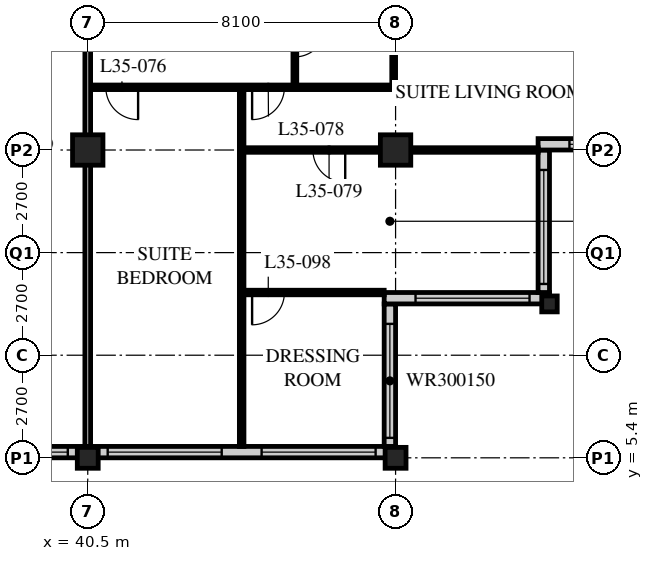
"""IFC4 building model, lengths in metres.
Left out: names, types, materials, properties, quantities, classifications, styles, units other than length and angle.
Written with IfcOpenShell. Run it as: python <this file> out.ifc"""

import sys

from ifc_helpers import new_model, si_unit, direction, frame, frame_2d, origin, origin_2d, place, context, subcontext, project, spatial, rectangle, hollow_rectangle, i_section, extrude, element, fill, save


model = new_model("IFC4")
c1 = context("Model", 3, precision=1e-05, world=origin(), true_north=direction((0.0, 1.0)))
c2 = subcontext(c1, "Body", "Model", "MODEL_VIEW")
j1 = project(units=[si_unit("LENGTHUNIT", "METRE"), si_unit("PLANEANGLEUNIT", "RADIAN")], contexts=[c1])
p1 = place(None, origin())
s1 = spatial("IfcSite", under=j1, at=p1, CompositionType="ELEMENT")
p2 = place(p1, origin())
s2 = spatial("IfcBuilding", under=s1, at=p2, CompositionType="ELEMENT")
p3 = place(p2, frame((0.0, 0.0, 137.4)))
s3 = spatial("IfcBuildingStorey", under=s2, at=p3, CompositionType="ELEMENT", Elevation=137.4)
p4 = place(p3, frame((40.5, 5.4, 0.0), z_axis=(0.0, 0.0, 1.0), x_axis=(1.0, 0.0, 0.0)))
e1 = element("IfcColumn", 1, at=p4, inside=s3, PredefinedType="COLUMN", context=c2, shape_type="SweptSolid", body=[
    extrude(hollow_rectangle(XDim=0.55, YDim=0.55, WallThickness=0.04, at=origin_2d()), origin(), (0.0, 0.0, 1.0), 3.4),
])
p5 = place(p3, frame((40.5, 13.5, 0.0), z_axis=(0.0, 0.0, 1.0), x_axis=(1.0, 0.0, 0.0)))
e2 = element("IfcColumn", 2, at=p5, inside=s3, PredefinedType="COLUMN", context=c2, shape_type="SweptSolid", body=[
    extrude(hollow_rectangle(XDim=0.8, YDim=0.8, WallThickness=0.08, at=origin_2d()), origin(), (0.0, 0.0, 1.0), 3.4),
])
p6 = place(p3, frame((48.6, 5.4, 0.0), z_axis=(0.0, 0.0, 1.0), x_axis=(1.0, 0.0, 0.0)))
e3 = element("IfcColumn", 3, at=p6, inside=s3, PredefinedType="COLUMN", context=c2, shape_type="SweptSolid", body=[
    extrude(hollow_rectangle(XDim=0.55, YDim=0.55, WallThickness=0.04, at=origin_2d()), origin(), (0.0, 0.0, 1.0), 3.4),
])
p7 = place(p3, frame((48.6, 13.5, 0.0), z_axis=(0.0, 0.0, 1.0), x_axis=(1.0, 0.0, 0.0)))
e4 = element("IfcColumn", 4, at=p7, inside=s3, PredefinedType="COLUMN", context=c2, shape_type="SweptSolid", body=[
    extrude(hollow_rectangle(XDim=0.8, YDim=0.8, WallThickness=0.08, at=origin_2d()), origin(), (0.0, 0.0, 1.0), 3.4),
])
p8 = place(p3, frame((52.65, 9.45, 0.0), z_axis=(0.0, 0.0, 1.0), x_axis=(1.0, 0.0, 0.0)))
e5 = element("IfcColumn", 5, at=p8, inside=s3, PredefinedType="COLUMN", context=c2, shape_type="SweptSolid", body=[
    extrude(i_section(OverallWidth=0.407, OverallDepth=0.419, WebThickness=0.031, FlangeThickness=0.049, FilletRadius=0.015, at=origin_2d()), origin(), (0.0, 0.0, 1.0), 3.4),
])
p9 = place(p3, frame((8.4, 5.55, 0.0), z_axis=(0.0, 0.0, 1.0), x_axis=(1.0, 0.0, 0.0)))
e6 = element("IfcWall", 6, at=p9, inside=s3, PredefinedType="SOLIDWALL", context=c2, shape_type="SweptSolid", body=[
    extrude(rectangle(XDim=40.2, YDim=0.3, at=frame_2d((20.1, 0.0))), origin(), (0.0, 0.0, 1.0), 3.19),
])
p10 = place(p9, frame((0.225, 0.0, 0.9)))
e7 = element("IfcOpeningElement", 7, at=p10, cuts=e6, PredefinedType="OPENING", context=c2, shape_type="SweptSolid", body=[
    extrude(rectangle(XDim=3.0, YDim=2.0, at=frame_2d((1.5, 1.0))), frame((0.0, 0.16, 0.0), z_axis=(0.0, -1.0, 0.0), x_axis=(1.0, 0.0, 0.0)), (0.0, 0.0, 1.0), 0.32),
])
p11 = place(p9, frame((4.275, 0.0, 0.9)))
e8 = element("IfcOpeningElement", 8, at=p11, cuts=e6, PredefinedType="OPENING", context=c2, shape_type="SweptSolid", body=[
    extrude(rectangle(XDim=3.0, YDim=2.0, at=frame_2d((1.5, 1.0))), frame((0.0, 0.16, 0.0), z_axis=(0.0, -1.0, 0.0), x_axis=(1.0, 0.0, 0.0)), (0.0, 0.0, 1.0), 0.32),
])
p12 = place(p9, frame((8.325, 0.0, 0.9)))
e9 = element("IfcOpeningElement", 9, at=p12, cuts=e6, PredefinedType="OPENING", context=c2, shape_type="SweptSolid", body=[
    extrude(rectangle(XDim=3.0, YDim=2.0, at=frame_2d((1.5, 1.0))), frame((0.0, 0.16, 0.0), z_axis=(0.0, -1.0, 0.0), x_axis=(1.0, 0.0, 0.0)), (0.0, 0.0, 1.0), 0.32),
])
p13 = place(p9, frame((12.375, 0.0, 0.9)))
e10 = element("IfcOpeningElement", 10, at=p13, cuts=e6, PredefinedType="OPENING", context=c2, shape_type="SweptSolid", body=[
    extrude(rectangle(XDim=3.0, YDim=2.0, at=frame_2d((1.5, 1.0))), frame((0.0, 0.16, 0.0), z_axis=(0.0, -1.0, 0.0), x_axis=(1.0, 0.0, 0.0)), (0.0, 0.0, 1.0), 0.32),
])
p14 = place(p9, frame((16.425, 0.0, 0.9)))
e11 = element("IfcOpeningElement", 11, at=p14, cuts=e6, PredefinedType="OPENING", context=c2, shape_type="SweptSolid", body=[
    extrude(rectangle(XDim=3.0, YDim=2.0, at=frame_2d((1.5, 1.0))), frame((0.0, 0.16, 0.0), z_axis=(0.0, -1.0, 0.0), x_axis=(1.0, 0.0, 0.0)), (0.0, 0.0, 1.0), 0.32),
])
p15 = place(p9, frame((20.475, 0.0, 0.9)))
e12 = element("IfcOpeningElement", 12, at=p15, cuts=e6, PredefinedType="OPENING", context=c2, shape_type="SweptSolid", body=[
    extrude(rectangle(XDim=3.0, YDim=2.0, at=frame_2d((1.5, 1.0))), frame((0.0, 0.16, 0.0), z_axis=(0.0, -1.0, 0.0), x_axis=(1.0, 0.0, 0.0)), (0.0, 0.0, 1.0), 0.32),
])
p16 = place(p9, frame((24.525, 0.0, 0.9)))
e13 = element("IfcOpeningElement", 13, at=p16, cuts=e6, PredefinedType="OPENING", context=c2, shape_type="SweptSolid", body=[
    extrude(rectangle(XDim=3.0, YDim=2.0, at=frame_2d((1.5, 1.0))), frame((0.0, 0.16, 0.0), z_axis=(0.0, -1.0, 0.0), x_axis=(1.0, 0.0, 0.0)), (0.0, 0.0, 1.0), 0.32),
])
p17 = place(p9, frame((28.575, 0.0, 0.9)))
e14 = element("IfcOpeningElement", 14, at=p17, cuts=e6, PredefinedType="OPENING", context=c2, shape_type="SweptSolid", body=[
    extrude(rectangle(XDim=3.0, YDim=2.0, at=frame_2d((1.5, 1.0))), frame((0.0, 0.16, 0.0), z_axis=(0.0, -1.0, 0.0), x_axis=(1.0, 0.0, 0.0)), (0.0, 0.0, 1.0), 0.32),
])
p18 = place(p9, frame((32.625, 0.0, 0.9)))
e15 = element("IfcOpeningElement", 15, at=p18, cuts=e6, PredefinedType="OPENING", context=c2, shape_type="SweptSolid", body=[
    extrude(rectangle(XDim=3.0, YDim=2.0, at=frame_2d((1.5, 1.0))), frame((0.0, 0.16, 0.0), z_axis=(0.0, -1.0, 0.0), x_axis=(1.0, 0.0, 0.0)), (0.0, 0.0, 1.0), 0.32),
])
p19 = place(p9, frame((36.675, 0.0, 0.9)))
e16 = element("IfcOpeningElement", 16, at=p19, cuts=e6, PredefinedType="OPENING", context=c2, shape_type="SweptSolid", body=[
    extrude(rectangle(XDim=3.0, YDim=2.0, at=frame_2d((1.5, 1.0))), frame((0.0, 0.16, 0.0), z_axis=(0.0, -1.0, 0.0), x_axis=(1.0, 0.0, 0.0)), (0.0, 0.0, 1.0), 0.32),
])
p20 = place(p3, frame((48.45, 5.7, 0.0), z_axis=(0.0, 0.0, 1.0), x_axis=(0.0, 1.0, 0.0)))
e17 = element("IfcWall", 17, at=p20, inside=s3, PredefinedType="SOLIDWALL", context=c2, shape_type="SweptSolid", body=[
    extrude(rectangle(XDim=3.75, YDim=0.3, at=frame_2d((1.875, 0.0))), origin(), (0.0, 0.0, 1.0), 3.19),
])
p21 = place(p20, frame((0.225, 0.0, 0.9)))
e18 = element("IfcOpeningElement", 18, at=p21, cuts=e17, PredefinedType="OPENING", context=c2, shape_type="SweptSolid", body=[
    extrude(rectangle(XDim=3.0, YDim=1.5, at=frame_2d((1.5, 0.75))), frame((0.0, 0.16, 0.0), z_axis=(0.0, -1.0, 0.0), x_axis=(1.0, 0.0, 0.0)), (0.0, 0.0, 1.0), 0.32),
])
p22 = place(p3, frame((48.3, 9.6, 0.0), z_axis=(0.0, 0.0, 1.0), x_axis=(1.0, 0.0, 0.0)))
e19 = element("IfcWall", 19, at=p22, inside=s3, PredefinedType="SOLIDWALL", context=c2, shape_type="SweptSolid", body=[
    extrude(rectangle(XDim=4.35, YDim=0.3, at=frame_2d((2.175, 0.0))), origin(), (0.0, 0.0, 1.0), 3.19),
])
p23 = place(p22, frame((0.825, 0.0, 0.9)))
e20 = element("IfcOpeningElement", 20, at=p23, cuts=e19, PredefinedType="OPENING", context=c2, shape_type="SweptSolid", body=[
    extrude(rectangle(XDim=3.0, YDim=1.5, at=frame_2d((1.5, 0.75))), frame((0.0, 0.16, 0.0), z_axis=(0.0, -1.0, 0.0), x_axis=(1.0, 0.0, 0.0)), (0.0, 0.0, 1.0), 0.32),
])
p24 = place(p3, frame((52.5, 9.75, 0.0), z_axis=(0.0, 0.0, 1.0), x_axis=(0.0, 1.0, 0.0)))
e21 = element("IfcWall", 21, at=p24, inside=s3, PredefinedType="SOLIDWALL", context=c2, shape_type="SweptSolid", body=[
    extrude(rectangle(XDim=3.75, YDim=0.3, at=frame_2d((1.875, 0.0))), origin(), (0.0, 0.0, 1.0), 3.19),
])
p25 = place(p24, frame((0.225, 0.0, 0.9)))
e22 = element("IfcOpeningElement", 22, at=p25, cuts=e21, PredefinedType="OPENING", context=c2, shape_type="SweptSolid", body=[
    extrude(rectangle(XDim=3.0, YDim=1.5, at=frame_2d((1.5, 0.75))), frame((0.0, 0.16, 0.0), z_axis=(0.0, -1.0, 0.0), x_axis=(1.0, 0.0, 0.0)), (0.0, 0.0, 1.0), 0.32),
])
p26 = place(p3, frame((52.35, 13.65, 0.0), z_axis=(0.0, 0.0, 1.0), x_axis=(1.0, 0.0, 0.0)))
e23 = element("IfcWall", 23, at=p26, inside=s3, PredefinedType="SOLIDWALL", context=c2, shape_type="SweptSolid", body=[
    extrude(rectangle(XDim=4.35, YDim=0.3, at=frame_2d((2.175, 0.0))), origin(), (0.0, 0.0, 1.0), 3.19),
])
p27 = place(p26, frame((0.825, 0.0, 0.9)))
e24 = element("IfcOpeningElement", 24, at=p27, cuts=e23, PredefinedType="OPENING", context=c2, shape_type="SweptSolid", body=[
    extrude(rectangle(XDim=3.0, YDim=1.5, at=frame_2d((1.5, 0.75))), frame((0.0, 0.16, 0.0), z_axis=(0.0, -1.0, 0.0), x_axis=(1.0, 0.0, 0.0)), (0.0, 0.0, 1.0), 0.32),
])
p28 = place(p3, frame((40.5, 15.15, 0.0), z_axis=(0.0, 0.0, 1.0), x_axis=(1.0, 0.0, 0.0)))
e25 = element("IfcWall", 25, at=p28, inside=s3, PredefinedType="PARTITIONING", context=c2, shape_type="SweptSolid", body=[
    extrude(rectangle(XDim=8.05, YDim=0.12, at=frame_2d((4.025, 0.0))), origin(), (0.0, 0.0, 1.0), 3.19),
])
p29 = place(p28, frame((0.475, 0.0, 0.0)))
e26 = element("IfcOpeningElement", 26, at=p29, cuts=e25, PredefinedType="OPENING", context=c2, shape_type="SweptSolid", body=[
    extrude(rectangle(XDim=0.85, YDim=2.1, at=frame_2d((0.425, 1.05))), frame((0.0, 0.07, 0.0), z_axis=(0.0, -1.0, 0.0), x_axis=(1.0, 0.0, 0.0)), (0.0, 0.0, 1.0), 0.14),
])
p30 = place(p28, frame((4.325, 0.0, 0.0)))
e27 = element("IfcOpeningElement", 27, at=p30, cuts=e25, PredefinedType="OPENING", context=c2, shape_type="SweptSolid", body=[
    extrude(rectangle(XDim=0.85, YDim=2.1, at=frame_2d((0.425, 1.05))), frame((0.0, 0.07, 0.0), z_axis=(0.0, -1.0, 0.0), x_axis=(1.0, 0.0, 0.0)), (0.0, 0.0, 1.0), 0.14),
])
p31 = place(p3, frame((45.95, 17.55, 0.0), z_axis=(0.0, 0.0, 1.0), x_axis=(0.0, -1.0, 0.0)))
e28 = element("IfcWall", 28, at=p31, inside=s3, PredefinedType="PARTITIONING", context=c2, shape_type="SweptSolid", body=[
    extrude(rectangle(XDim=2.4, YDim=0.1, at=frame_2d((1.2, 0.0))), origin(), (0.0, 0.0, 1.0), 3.19),
])
p32 = place(p31, frame((0.8, 0.0, 0.0)))
e29 = element("IfcOpeningElement", 29, at=p32, cuts=e28, PredefinedType="OPENING", context=c2, shape_type="SweptSolid", body=[
    extrude(rectangle(XDim=0.8, YDim=2.1, at=frame_2d((0.4, 1.05))), frame((0.0, 0.06, 0.0), z_axis=(0.0, -1.0, 0.0), x_axis=(1.0, 0.0, 0.0)), (0.0, 0.0, 1.0), 0.12),
])
p33 = place(p3, frame((48.55, 17.55, 0.0), z_axis=(0.0, 0.0, 1.0), x_axis=(0.0, -1.0, 0.0)))
e30 = element("IfcWall", 30, at=p33, inside=s3, PredefinedType="PARTITIONING", context=c2, shape_type="SweptSolid", body=[
    extrude(rectangle(XDim=2.4, YDim=0.1, at=frame_2d((1.2, 0.0))), origin(), (0.0, 0.0, 1.0), 2.578),
])
p34 = place(p3, frame((44.55, 15.15, 0.0), z_axis=(0.0, 0.0, 1.0), x_axis=(0.0, -1.0, 0.0)))
e31 = element("IfcWall", 31, at=p34, inside=s3, PredefinedType="PARTITIONING", context=c2, shape_type="SweptSolid", body=[
    extrude(rectangle(XDim=9.45, YDim=0.12, at=frame_2d((4.725, 0.0))), origin(), (0.0, 0.0, 1.0), 3.19),
])
p35 = place(p3, frame((44.55, 13.5, 0.0), z_axis=(0.0, 0.0, 1.0), x_axis=(1.0, 0.0, 0.0)))
e32 = element("IfcWall", 32, at=p35, inside=s3, PredefinedType="PARTITIONING", context=c2, shape_type="SweptSolid", body=[
    extrude(rectangle(XDim=7.8, YDim=0.12, at=frame_2d((3.9, 0.0))), origin(), (0.0, 0.0, 1.0), 2.578),
])
p36 = place(p35, frame((1.875, 0.0, 0.0)))
e33 = element("IfcOpeningElement", 33, at=p36, cuts=e32, PredefinedType="OPENING", context=c2, shape_type="SweptSolid", body=[
    extrude(rectangle(XDim=0.85, YDim=2.1, at=frame_2d((0.425, 1.05))), frame((0.0, 0.07, 0.0), z_axis=(0.0, -1.0, 0.0), x_axis=(1.0, 0.0, 0.0)), (0.0, 0.0, 1.0), 0.14),
])
p37 = place(p3, frame((40.5, 17.55, 0.0), z_axis=(0.0, 0.0, 1.0), x_axis=(0.0, -1.0, 0.0)))
e34 = element("IfcWall", 34, at=p37, inside=s3, PredefinedType="PARTITIONING", context=c2, shape_type="SweptSolid", body=[
    extrude(rectangle(XDim=11.85, YDim=0.15, at=frame_2d((5.925, 0.0))), origin(), (0.0, 0.0, 1.0), 2.578),
])
p38 = place(p3, frame((44.55, 9.75, 0.0), z_axis=(0.0, 0.0, 1.0), x_axis=(1.0, 0.0, 0.0)))
e35 = element("IfcWall", 35, at=p38, inside=s3, PredefinedType="PARTITIONING", context=c2, shape_type="SweptSolid", body=[
    extrude(rectangle(XDim=3.75, YDim=0.12, at=frame_2d((1.875, 0.0))), origin(), (0.0, 0.0, 1.0), 3.19),
])
p39 = place(p38, frame((0.275, 0.0, 0.0)))
e36 = element("IfcOpeningElement", 36, at=p39, cuts=e35, PredefinedType="OPENING", context=c2, shape_type="SweptSolid", body=[
    extrude(rectangle(XDim=0.85, YDim=2.1, at=frame_2d((0.425, 1.05))), frame((0.0, 0.07, 0.0), z_axis=(0.0, -1.0, 0.0), x_axis=(1.0, 0.0, 0.0)), (0.0, 0.0, 1.0), 0.14),
])
p40 = place(p17, origin())
e37 = element("IfcWindow", 37, at=p40, inside=s3, PartitioningType="SINGLE_PANEL", PredefinedType="WINDOW", context=c2, shape_type="SweptSolid", body=[
    extrude(rectangle(XDim=3.0, YDim=2.0, at=frame_2d((1.5, 1.0))), frame((0.0, 0.03, 0.0), z_axis=(0.0, -1.0, 0.0), x_axis=(1.0, 0.0, 0.0)), (0.0, 0.0, 1.0), 0.06),
])
fill(e14, e37)
p41 = place(p18, origin())
e38 = element("IfcWindow", 38, at=p41, inside=s3, PartitioningType="SINGLE_PANEL", PredefinedType="WINDOW", context=c2, shape_type="SweptSolid", body=[
    extrude(rectangle(XDim=3.0, YDim=2.0, at=frame_2d((1.5, 1.0))), frame((0.0, 0.03, 0.0), z_axis=(0.0, -1.0, 0.0), x_axis=(1.0, 0.0, 0.0)), (0.0, 0.0, 1.0), 0.06),
])
fill(e15, e38)
p42 = place(p19, origin())
e39 = element("IfcWindow", 39, at=p42, inside=s3, PartitioningType="SINGLE_PANEL", PredefinedType="WINDOW", context=c2, shape_type="SweptSolid", body=[
    extrude(rectangle(XDim=3.0, YDim=2.0, at=frame_2d((1.5, 1.0))), frame((0.0, 0.03, 0.0), z_axis=(0.0, -1.0, 0.0), x_axis=(1.0, 0.0, 0.0)), (0.0, 0.0, 1.0), 0.06),
])
fill(e16, e39)
p43 = place(p21, origin())
e40 = element("IfcWindow", 40, at=p43, inside=s3, PartitioningType="SINGLE_PANEL", PredefinedType="WINDOW", context=c2, shape_type="SweptSolid", body=[
    extrude(rectangle(XDim=3.0, YDim=1.5, at=frame_2d((1.5, 0.75))), frame((0.0, 0.03, 0.0), z_axis=(0.0, -1.0, 0.0), x_axis=(1.0, 0.0, 0.0)), (0.0, 0.0, 1.0), 0.06),
])
fill(e18, e40)
p44 = place(p23, origin())
e41 = element("IfcWindow", 41, at=p44, inside=s3, PartitioningType="SINGLE_PANEL", PredefinedType="WINDOW", context=c2, shape_type="SweptSolid", body=[
    extrude(rectangle(XDim=3.0, YDim=1.5, at=frame_2d((1.5, 0.75))), frame((0.0, 0.03, 0.0), z_axis=(0.0, -1.0, 0.0), x_axis=(1.0, 0.0, 0.0)), (0.0, 0.0, 1.0), 0.06),
])
fill(e20, e41)
p45 = place(p25, origin())
e42 = element("IfcWindow", 42, at=p45, inside=s3, PartitioningType="SINGLE_PANEL", PredefinedType="WINDOW", context=c2, shape_type="SweptSolid", body=[
    extrude(rectangle(XDim=3.0, YDim=1.5, at=frame_2d((1.5, 0.75))), frame((0.0, 0.03, 0.0), z_axis=(0.0, -1.0, 0.0), x_axis=(1.0, 0.0, 0.0)), (0.0, 0.0, 1.0), 0.06),
])
fill(e22, e42)
p46 = place(p27, origin())
e43 = element("IfcWindow", 43, at=p46, inside=s3, PartitioningType="SINGLE_PANEL", PredefinedType="WINDOW", context=c2, shape_type="SweptSolid", body=[
    extrude(rectangle(XDim=3.0, YDim=1.5, at=frame_2d((1.5, 0.75))), frame((0.0, 0.03, 0.0), z_axis=(0.0, -1.0, 0.0), x_axis=(1.0, 0.0, 0.0)), (0.0, 0.0, 1.0), 0.06),
])
fill(e24, e43)
p47 = place(p29, origin())
e44 = element("IfcDoor", 44, at=p47, inside=s3, OperationType="SINGLE_SWING_LEFT", PredefinedType="DOOR", context=c2, shape_type="SweptSolid", body=[
    extrude(rectangle(XDim=0.85, YDim=2.1, at=frame_2d((0.425, 1.05))), frame((0.0, 0.025, 0.0), z_axis=(0.0, -1.0, 0.0), x_axis=(1.0, 0.0, 0.0)), (0.0, 0.0, 1.0), 0.05),
])
fill(e26, e44)
p48 = place(p32, origin())
e45 = element("IfcDoor", 45, at=p48, inside=s3, OperationType="SINGLE_SWING_LEFT", PredefinedType="DOOR", context=c2, shape_type="SweptSolid", body=[
    extrude(rectangle(XDim=0.8, YDim=2.1, at=frame_2d((0.4, 1.05))), frame((0.0, 0.025, 0.0), z_axis=(0.0, -1.0, 0.0), x_axis=(1.0, 0.0, 0.0)), (0.0, 0.0, 1.0), 0.05),
])
fill(e29, e45)
p49 = place(p30, origin())
e46 = element("IfcDoor", 46, at=p49, inside=s3, OperationType="SINGLE_SWING_RIGHT", PredefinedType="DOOR", context=c2, shape_type="SweptSolid", body=[
    extrude(rectangle(XDim=0.85, YDim=2.1, at=frame_2d((0.425, 1.05))), frame((0.0, 0.025, 0.0), z_axis=(0.0, -1.0, 0.0), x_axis=(1.0, 0.0, 0.0)), (0.0, 0.0, 1.0), 0.05),
])
fill(e27, e46)
p50 = place(p36, origin())
e47 = element("IfcDoor", 47, at=p50, inside=s3, OperationType="SINGLE_SWING_LEFT", PredefinedType="DOOR", context=c2, shape_type="SweptSolid", body=[
    extrude(rectangle(XDim=0.85, YDim=2.1, at=frame_2d((0.425, 1.05))), frame((0.0, 0.025, 0.0), z_axis=(0.0, -1.0, 0.0), x_axis=(1.0, 0.0, 0.0)), (0.0, 0.0, 1.0), 0.05),
])
fill(e33, e47)
p51 = place(p39, origin())
e48 = element("IfcDoor", 48, at=p51, inside=s3, OperationType="SINGLE_SWING_RIGHT", PredefinedType="DOOR", context=c2, shape_type="SweptSolid", body=[
    extrude(rectangle(XDim=0.85, YDim=2.1, at=frame_2d((0.425, 1.05))), frame((0.0, 0.025, 0.0), z_axis=(0.0, -1.0, 0.0), x_axis=(1.0, 0.0, 0.0)), (0.0, 0.0, 1.0), 0.05),
])
fill(e36, e48)
save(model, sys.argv[1])
